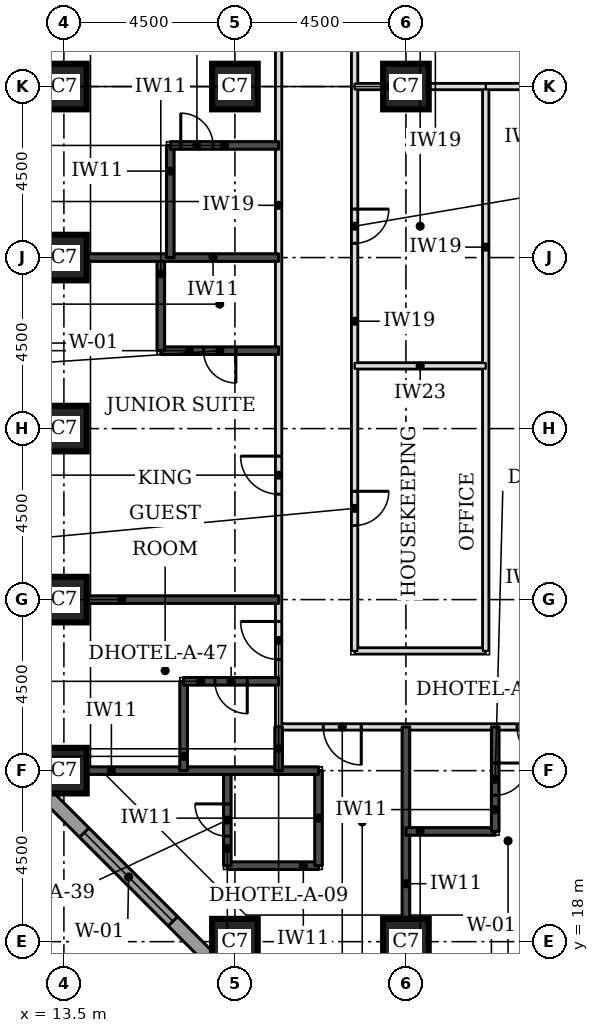
"""IFC4 building model, lengths in metres.
Left out: names, types, materials, properties, quantities, classifications, styles, units other than length and angle.
Written with IfcOpenShell. Run it as: python <this file> out.ifc"""

import sys

from ifc_helpers import new_model, si_unit, direction, frame, frame_2d, origin, origin_2d, place, context, subcontext, project, spatial, rectangle, extrude, element, fill, save


model = new_model("IFC4")
c1 = context("Model", 3, precision=1e-05, world=origin(), true_north=direction((0.0, 1.0)))
c2 = subcontext(c1, "Body", "Model", "MODEL_VIEW")
j1 = project(units=[si_unit("LENGTHUNIT", "METRE"), si_unit("PLANEANGLEUNIT", "RADIAN")], contexts=[c1])
p1 = place(None, origin())
s1 = spatial("IfcSite", under=j1, at=p1, CompositionType="ELEMENT")
p2 = place(p1, origin())
s2 = spatial("IfcBuilding", under=s1, at=p2, CompositionType="ELEMENT")
p3 = place(p2, frame((0.0, 0.0, 49.5)))
s3 = spatial("IfcBuildingStorey", under=s2, at=p3, CompositionType="ELEMENT", Elevation=49.5)
for number, where, z_axis, x_axis in (
    (1, (18.0, 18.0, 0.0), (0.0, 0.0, 1.0), (1.0, 0.0, 0.0)),
    (2, (22.5, 18.0, 0.0), (0.0, 0.0, 1.0), (1.0, 0.0, 0.0)),
    (3, (13.5, 22.5, 0.0), (0.0, 0.0, 1.0), (1.0, 0.0, 0.0)),
    (4, (13.5, 27.0, 0.0), (0.0, 0.0, 1.0), (1.0, 0.0, 0.0)),
    (5, (13.5, 31.5, 0.0), (0.0, 0.0, 1.0), (1.0, 0.0, 0.0)),
    (6, (13.5, 36.0, 0.0), (0.0, 0.0, 1.0), (1.0, 0.0, 0.0)),
    (7, (13.5, 40.5, 0.0), (0.0, 0.0, 1.0), (1.0, 0.0, 0.0)),
    (8, (18.0, 40.5, 0.0), (0.0, 0.0, 1.0), (1.0, 0.0, 0.0)),
    (9, (22.5, 40.5, 0.0), (0.0, 0.0, 1.0), (1.0, 0.0, 0.0)),
):
    element("IfcColumn", number, at=place(p3, frame(where, z_axis=z_axis, x_axis=x_axis)), inside=s3, PredefinedType="COLUMN", context=c2, shape_type="SweptSolid", body=[
        extrude(rectangle(XDim=1.2, YDim=1.2, at=origin_2d()), origin(), (0.0, 0.0, 1.0), 3.3),
    ])
p4 = place(p3, frame((12.674, 22.23, 0.0), z_axis=(0.0, 0.0, 1.0), x_axis=(0.707106781187, -0.707106781187, 0.0)))
e10 = element("IfcWall", 10, at=p4, inside=s3, PredefinedType="STANDARD", context=c2, shape_type="SweptSolid", body=[
    extrude(rectangle(XDim=7.151, YDim=0.35, at=frame_2d((3.576, 0.0))), origin(), (0.0, 0.0, 1.0), 3.055),
])
p5 = place(p4, frame((1.926, 0.0, 0.8)))
e11 = element("IfcOpeningElement", 11, at=p5, cuts=e10, PredefinedType="OPENING", context=c2, shape_type="SweptSolid", body=[
    extrude(rectangle(XDim=3.3, YDim=1.5, at=frame_2d((1.65, 0.75))), frame((0.0, 0.185, 0.0), z_axis=(0.0, -1.0, 0.0), x_axis=(1.0, 0.0, 0.0)), (0.0, 0.0, 1.0), 0.37),
])
p6 = place(p3, frame((19.15, 23.65, 0.0), z_axis=(0.0, 0.0, 1.0), x_axis=(1.0, 0.0, 0.0)))
e12 = element("IfcWall", 12, at=p6, inside=s3, PredefinedType="PARTITIONING", context=c2, shape_type="SweptSolid", body=[
    extrude(rectangle(XDim=32.35, YDim=0.15, at=frame_2d((16.175, 0.0))), origin(), (0.0, 0.0, 1.0), 3.08),
])
p7 = place(p6, frame((6.275, 0.0, 0.0)))
e13 = element("IfcOpeningElement", 13, at=p7, cuts=e12, PredefinedType="OPENING", context=c2, shape_type="SweptSolid", body=[
    extrude(rectangle(XDim=1.0, YDim=2.1, at=frame_2d((0.5, 1.05))), frame((0.0, 0.085, 0.0), z_axis=(0.0, -1.0, 0.0), x_axis=(1.0, 0.0, 0.0)), (0.0, 0.0, 1.0), 0.17),
])
p8 = place(p6, frame((8.675, 0.0, 0.0)))
e14 = element("IfcOpeningElement", 14, at=p8, cuts=e12, PredefinedType="OPENING", context=c2, shape_type="SweptSolid", body=[
    extrude(rectangle(XDim=1.0, YDim=2.1, at=frame_2d((0.5, 1.05))), frame((0.0, 0.085, 0.0), z_axis=(0.0, -1.0, 0.0), x_axis=(1.0, 0.0, 0.0)), (0.0, 0.0, 1.0), 0.17),
])
p9 = place(p6, frame((15.25, 0.0, 0.0)))
e15 = element("IfcOpeningElement", 15, at=p9, cuts=e12, PredefinedType="OPENING", context=c2, shape_type="SweptSolid", body=[
    extrude(rectangle(XDim=1.0, YDim=2.1, at=frame_2d((0.5, 1.05))), frame((0.0, 0.085, 0.0), z_axis=(0.0, -1.0, 0.0), x_axis=(1.0, 0.0, 0.0)), (0.0, 0.0, 1.0), 0.17),
])
p10 = place(p6, frame((17.675, 0.0, 0.0)))
e16 = element("IfcOpeningElement", 16, at=p10, cuts=e12, PredefinedType="OPENING", context=c2, shape_type="SweptSolid", body=[
    extrude(rectangle(XDim=1.0, YDim=2.1, at=frame_2d((0.5, 1.05))), frame((0.0, 0.085, 0.0), z_axis=(0.0, -1.0, 0.0), x_axis=(1.0, 0.0, 0.0)), (0.0, 0.0, 1.0), 0.17),
])
p11 = place(p6, frame((24.275, 0.0, 0.0)))
e17 = element("IfcOpeningElement", 17, at=p11, cuts=e12, PredefinedType="OPENING", context=c2, shape_type="SweptSolid", body=[
    extrude(rectangle(XDim=1.0, YDim=2.1, at=frame_2d((0.5, 1.05))), frame((0.0, 0.085, 0.0), z_axis=(0.0, -1.0, 0.0), x_axis=(1.0, 0.0, 0.0)), (0.0, 0.0, 1.0), 0.17),
])
p12 = place(p6, frame((26.675, 0.0, 0.0)))
e18 = element("IfcOpeningElement", 18, at=p12, cuts=e12, PredefinedType="OPENING", context=c2, shape_type="SweptSolid", body=[
    extrude(rectangle(XDim=1.0, YDim=2.1, at=frame_2d((0.5, 1.05))), frame((0.0, 0.085, 0.0), z_axis=(0.0, -1.0, 0.0), x_axis=(1.0, 0.0, 0.0)), (0.0, 0.0, 1.0), 0.17),
])
p13 = place(p6, frame((1.175, 0.0, 0.0)))
e19 = element("IfcOpeningElement", 19, at=p13, cuts=e12, PredefinedType="OPENING", context=c2, shape_type="SweptSolid", body=[
    extrude(rectangle(XDim=1.0, YDim=2.1, at=frame_2d((0.5, 1.05))), frame((0.0, 0.085, 0.0), z_axis=(0.0, -1.0, 0.0), x_axis=(1.0, 0.0, 0.0)), (0.0, 0.0, 1.0), 0.17),
])
p14 = place(p6, frame((30.85, 0.0, 0.0)))
e20 = element("IfcOpeningElement", 20, at=p14, cuts=e12, PredefinedType="OPENING", context=c2, shape_type="SweptSolid", body=[
    extrude(rectangle(XDim=1.0, YDim=2.1, at=frame_2d((0.5, 1.05))), frame((0.0, 0.085, 0.0), z_axis=(0.0, -1.0, 0.0), x_axis=(1.0, 0.0, 0.0)), (0.0, 0.0, 1.0), 0.17),
])
p15 = place(p3, frame((19.15, 23.65, 0.0), z_axis=(0.0, 0.0, 1.0), x_axis=(0.0, 1.0, 0.0)))
e21 = element("IfcWall", 21, at=p15, inside=s3, PredefinedType="PARTITIONING", context=c2, shape_type="SweptSolid", body=[
    extrude(rectangle(XDim=25.85, YDim=0.15, at=frame_2d((12.925, 0.0))), origin(), (0.0, 0.0, 1.0), 3.08),
])
p16 = place(p15, frame((1.775, 0.0, 0.0)))
e22 = element("IfcOpeningElement", 22, at=p16, cuts=e21, PredefinedType="OPENING", context=c2, shape_type="SweptSolid", body=[
    extrude(rectangle(XDim=1.0, YDim=2.1, at=frame_2d((0.5, 1.05))), frame((0.0, 0.085, 0.0), z_axis=(0.0, -1.0, 0.0), x_axis=(1.0, 0.0, 0.0)), (0.0, 0.0, 1.0), 0.17),
])
p17 = place(p15, frame((6.125, 0.0, 0.0)))
e23 = element("IfcOpeningElement", 23, at=p17, cuts=e21, PredefinedType="OPENING", context=c2, shape_type="SweptSolid", body=[
    extrude(rectangle(XDim=1.0, YDim=2.1, at=frame_2d((0.5, 1.05))), frame((0.0, 0.085, 0.0), z_axis=(0.0, -1.0, 0.0), x_axis=(1.0, 0.0, 0.0)), (0.0, 0.0, 1.0), 0.17),
])
p18 = place(p15, frame((17.825, 0.0, 0.0)))
e24 = element("IfcOpeningElement", 24, at=p18, cuts=e21, PredefinedType="OPENING", context=c2, shape_type="SweptSolid", body=[
    extrude(rectangle(XDim=1.0, YDim=2.1, at=frame_2d((0.5, 1.05))), frame((0.0, 0.085, 0.0), z_axis=(0.0, -1.0, 0.0), x_axis=(1.0, 0.0, 0.0)), (0.0, 0.0, 1.0), 0.17),
])
p19 = place(p15, frame((23.04, 0.0, 0.0)))
e25 = element("IfcOpeningElement", 25, at=p19, cuts=e21, PredefinedType="OPENING", context=c2, shape_type="SweptSolid", body=[
    extrude(rectangle(XDim=0.9, YDim=2.1, at=frame_2d((0.45, 1.05))), frame((0.0, 0.085, 0.0), z_axis=(0.0, -1.0, 0.0), x_axis=(1.0, 0.0, 0.0)), (0.0, 0.0, 1.0), 0.17),
])
p20 = place(p3, frame((21.15, 25.65, 0.0), z_axis=(0.0, 0.0, 1.0), x_axis=(1.0, 0.0, 0.0)))
e26 = element("IfcWall", 26, at=p20, inside=s3, PredefinedType="PARTITIONING", context=c2, shape_type="SweptSolid", body=[
    extrude(rectangle(XDim=3.45, YDim=0.15, at=frame_2d((1.725, 0.0))), origin(), (0.0, 0.0, 1.0), 3.08),
])
p21 = place(p3, frame((21.15, 25.65, 0.0), z_axis=(0.0, 0.0, 1.0), x_axis=(0.0, 1.0, 0.0)))
e27 = element("IfcWall", 27, at=p21, inside=s3, PredefinedType="PARTITIONING", context=c2, shape_type="SweptSolid", body=[
    extrude(rectangle(XDim=17.35, YDim=0.15, at=frame_2d((8.675, 0.0))), origin(), (0.0, 0.0, 1.0), 3.08),
])
p22 = place(p21, frame((3.3, 0.0, 0.0)))
e28 = element("IfcOpeningElement", 28, at=p22, cuts=e27, PredefinedType="OPENING", context=c2, shape_type="SweptSolid", body=[
    extrude(rectangle(XDim=0.9, YDim=2.1, at=frame_2d((0.45, 1.05))), frame((0.0, 0.085, 0.0), z_axis=(0.0, -1.0, 0.0), x_axis=(1.0, 0.0, 0.0)), (0.0, 0.0, 1.0), 0.17),
])
p23 = place(p21, frame((10.725, 0.0, 0.0)))
e29 = element("IfcOpeningElement", 29, at=p23, cuts=e27, PredefinedType="OPENING", context=c2, shape_type="SweptSolid", body=[
    extrude(rectangle(XDim=0.9, YDim=2.1, at=frame_2d((0.45, 1.05))), frame((0.0, 0.085, 0.0), z_axis=(0.0, -1.0, 0.0), x_axis=(1.0, 0.0, 0.0)), (0.0, 0.0, 1.0), 0.17),
])
p24 = place(p3, frame((24.6, 25.65, 0.0), z_axis=(0.0, 0.0, 1.0), x_axis=(0.0, 1.0, 0.0)))
e30 = element("IfcWall", 30, at=p24, inside=s3, PredefinedType="PARTITIONING", context=c2, shape_type="SweptSolid", body=[
    extrude(rectangle(XDim=14.85, YDim=0.15, at=frame_2d((7.425, 0.0))), origin(), (0.0, 0.0, 1.0), 3.08),
])
p25 = place(p3, frame((24.6, 40.5, 0.0), z_axis=(0.0, 0.0, 1.0), x_axis=(1.0, 0.0, 0.0)))
e31 = element("IfcWall", 31, at=p25, inside=s3, PredefinedType="PARTITIONING", context=c2, shape_type="SweptSolid", body=[
    extrude(rectangle(XDim=2.35, YDim=0.15, at=frame_2d((1.175, 0.0))), origin(), (0.0, 0.0, 1.0), 2.33),
])
p26 = place(p3, frame((22.5, 18.6, 0.0), z_axis=(0.0, 0.0, 1.0), x_axis=(0.0, 1.0, 0.0)))
e32 = element("IfcWall", 32, at=p26, inside=s3, PredefinedType="SOLIDWALL", context=c2, shape_type="SweptSolid", body=[
    extrude(rectangle(XDim=5.05, YDim=0.2, at=frame_2d((2.525, 0.0))), origin(), (0.0, 0.0, 1.0), 3.08),
])
p27 = place(p3, frame((17.8, 20.0, 0.0), z_axis=(0.0, 0.0, 1.0), x_axis=(1.0, 0.0, 0.0)))
e33 = element("IfcWall", 33, at=p27, inside=s3, PredefinedType="SOLIDWALL", context=c2, shape_type="SweptSolid", body=[
    extrude(rectangle(XDim=2.4, YDim=0.2, at=frame_2d((1.2, 0.0))), origin(), (0.0, 0.0, 1.0), 3.08),
])
p28 = place(p3, frame((17.8, 20.0, 0.0), z_axis=(0.0, 0.0, 1.0), x_axis=(0.0, 1.0, 0.0)))
e34 = element("IfcWall", 34, at=p28, inside=s3, PredefinedType="SOLIDWALL", context=c2, shape_type="SweptSolid", body=[
    extrude(rectangle(XDim=2.5, YDim=0.2, at=frame_2d((1.25, 0.0))), origin(), (0.0, 0.0, 1.0), 3.08),
])
p29 = place(p28, frame((0.775, 0.0, 0.0)))
e35 = element("IfcOpeningElement", 35, at=p29, cuts=e34, PredefinedType="OPENING", context=c2, shape_type="SweptSolid", body=[
    extrude(rectangle(XDim=0.85, YDim=2.1, at=frame_2d((0.425, 1.05))), frame((0.0, 0.11, 0.0), z_axis=(0.0, -1.0, 0.0), x_axis=(1.0, 0.0, 0.0)), (0.0, 0.0, 1.0), 0.22),
])
p30 = place(p3, frame((20.2, 20.0, 0.0), z_axis=(0.0, 0.0, 1.0), x_axis=(0.0, 1.0, 0.0)))
e36 = element("IfcWall", 36, at=p30, inside=s3, PredefinedType="SOLIDWALL", context=c2, shape_type="SweptSolid", body=[
    extrude(rectangle(XDim=2.5, YDim=0.2, at=frame_2d((1.25, 0.0))), origin(), (0.0, 0.0, 1.0), 3.08),
])
p31 = place(p3, frame((22.5, 20.9, 0.0), z_axis=(0.0, 0.0, 1.0), x_axis=(1.0, 0.0, 0.0)))
e37 = element("IfcWall", 37, at=p31, inside=s3, PredefinedType="SOLIDWALL", context=c2, shape_type="SweptSolid", body=[
    extrude(rectangle(XDim=2.35, YDim=0.2, at=frame_2d((1.175, 0.0))), origin(), (0.0, 0.0, 1.0), 3.08),
])
p32 = place(p3, frame((24.85, 20.9, 0.0), z_axis=(0.0, 0.0, 1.0), x_axis=(0.0, 1.0, 0.0)))
e38 = element("IfcWall", 38, at=p32, inside=s3, PredefinedType="SOLIDWALL", context=c2, shape_type="SweptSolid", body=[
    extrude(rectangle(XDim=2.75, YDim=0.2, at=frame_2d((1.375, 0.0))), origin(), (0.0, 0.0, 1.0), 3.08),
])
p33 = place(p32, frame((0.95, 0.0, 0.0)))
e39 = element("IfcOpeningElement", 39, at=p33, cuts=e38, PredefinedType="OPENING", context=c2, shape_type="SweptSolid", body=[
    extrude(rectangle(XDim=0.85, YDim=2.1, at=frame_2d((0.425, 1.05))), frame((0.0, 0.11, 0.0), z_axis=(0.0, -1.0, 0.0), x_axis=(1.0, 0.0, 0.0)), (0.0, 0.0, 1.0), 0.22),
])
p34 = place(p3, frame((14.1, 22.5, 0.0), z_axis=(0.0, 0.0, 1.0), x_axis=(1.0, 0.0, 0.0)))
e40 = element("IfcWall", 40, at=p34, inside=s3, PredefinedType="SOLIDWALL", context=c2, shape_type="SweptSolid", body=[
    extrude(rectangle(XDim=6.1, YDim=0.2, at=frame_2d((3.05, 0.0))), origin(), (0.0, 0.0, 1.0), 3.08),
])
p35 = place(p3, frame((16.65, 22.5, 0.0), z_axis=(0.0, 0.0, 1.0), x_axis=(0.0, 1.0, 0.0)))
e41 = element("IfcWall", 41, at=p35, inside=s3, PredefinedType="SOLIDWALL", context=c2, shape_type="SweptSolid", body=[
    extrude(rectangle(XDim=2.35, YDim=0.2, at=frame_2d((1.175, 0.0))), origin(), (0.0, 0.0, 1.0), 3.08),
])
p36 = place(p3, frame((19.15, 22.5, 0.0), z_axis=(0.0, 0.0, 1.0), x_axis=(0.0, 1.0, 0.0)))
e42 = element("IfcWall", 42, at=p36, inside=s3, PredefinedType="SOLIDWALL", context=c2, shape_type="SweptSolid", body=[
    extrude(rectangle(XDim=1.15, YDim=0.2, at=frame_2d((0.575, 0.0))), origin(), (0.0, 0.0, 1.0), 3.08),
])
p37 = place(p3, frame((16.65, 24.85, 0.0), z_axis=(0.0, 0.0, 1.0), x_axis=(1.0, 0.0, 0.0)))
e43 = element("IfcWall", 43, at=p37, inside=s3, PredefinedType="SOLIDWALL", context=c2, shape_type="SweptSolid", body=[
    extrude(rectangle(XDim=2.5, YDim=0.2, at=frame_2d((1.25, 0.0))), origin(), (0.0, 0.0, 1.0), 3.08),
])
p38 = place(p37, frame((0.825, 0.0, 0.0)))
e44 = element("IfcOpeningElement", 44, at=p38, cuts=e43, PredefinedType="OPENING", context=c2, shape_type="SweptSolid", body=[
    extrude(rectangle(XDim=0.85, YDim=2.1, at=frame_2d((0.425, 1.05))), frame((0.0, 0.11, 0.0), z_axis=(0.0, -1.0, 0.0), x_axis=(1.0, 0.0, 0.0)), (0.0, 0.0, 1.0), 0.22),
])
p39 = place(p3, frame((14.1, 27.0, 0.0), z_axis=(0.0, 0.0, 1.0), x_axis=(1.0, 0.0, 0.0)))
e45 = element("IfcWall", 45, at=p39, inside=s3, PredefinedType="SOLIDWALL", context=c2, shape_type="SweptSolid", body=[
    extrude(rectangle(XDim=5.05, YDim=0.2, at=frame_2d((2.525, 0.0))), origin(), (0.0, 0.0, 1.0), 3.08),
])
p40 = place(p3, frame((16.05, 33.55, 0.0), z_axis=(0.0, 0.0, 1.0), x_axis=(1.0, 0.0, 0.0)))
e46 = element("IfcWall", 46, at=p40, inside=s3, PredefinedType="SOLIDWALL", context=c2, shape_type="SweptSolid", body=[
    extrude(rectangle(XDim=3.1, YDim=0.2, at=frame_2d((1.55, 0.0))), origin(), (0.0, 0.0, 1.0), 3.08),
])
p41 = place(p40, frame((1.125, 0.0, 0.0)))
e47 = element("IfcOpeningElement", 47, at=p41, cuts=e46, PredefinedType="OPENING", context=c2, shape_type="SweptSolid", body=[
    extrude(rectangle(XDim=0.85, YDim=2.1, at=frame_2d((0.425, 1.05))), frame((0.0, 0.11, 0.0), z_axis=(0.0, -1.0, 0.0), x_axis=(1.0, 0.0, 0.0)), (0.0, 0.0, 1.0), 0.22),
])
p42 = place(p3, frame((16.05, 33.55, 0.0), z_axis=(0.0, 0.0, 1.0), x_axis=(0.0, 1.0, 0.0)))
e48 = element("IfcWall", 48, at=p42, inside=s3, PredefinedType="SOLIDWALL", context=c2, shape_type="SweptSolid", body=[
    extrude(rectangle(XDim=2.45, YDim=0.2, at=frame_2d((1.225, 0.0))), origin(), (0.0, 0.0, 1.0), 3.08),
])
p43 = place(p3, frame((14.1, 36.0, 0.0), z_axis=(0.0, 0.0, 1.0), x_axis=(1.0, 0.0, 0.0)))
e49 = element("IfcWall", 49, at=p43, inside=s3, PredefinedType="SOLIDWALL", context=c2, shape_type="SweptSolid", body=[
    extrude(rectangle(XDim=5.05, YDim=0.2, at=frame_2d((2.525, 0.0))), origin(), (0.0, 0.0, 1.0), 3.08),
])
p44 = place(p3, frame((16.3, 36.0, 0.0), z_axis=(0.0, 0.0, 1.0), x_axis=(0.0, 1.0, 0.0)))
e50 = element("IfcWall", 50, at=p44, inside=s3, PredefinedType="SOLIDWALL", context=c2, shape_type="SweptSolid", body=[
    extrude(rectangle(XDim=2.95, YDim=0.2, at=frame_2d((1.475, 0.0))), origin(), (0.0, 0.0, 1.0), 3.08),
])
p45 = place(p3, frame((16.3, 38.95, 0.0), z_axis=(0.0, 0.0, 1.0), x_axis=(1.0, 0.0, 0.0)))
e51 = element("IfcWall", 51, at=p45, inside=s3, PredefinedType="SOLIDWALL", context=c2, shape_type="SweptSolid", body=[
    extrude(rectangle(XDim=2.85, YDim=0.2, at=frame_2d((1.425, 0.0))), origin(), (0.0, 0.0, 1.0), 3.08),
])
p46 = place(p45, frame((0.275, 0.0, 0.0)))
e52 = element("IfcOpeningElement", 52, at=p46, cuts=e51, PredefinedType="OPENING", context=c2, shape_type="SweptSolid", body=[
    extrude(rectangle(XDim=0.85, YDim=2.1, at=frame_2d((0.425, 1.05))), frame((0.0, 0.11, 0.0), z_axis=(0.0, -1.0, 0.0), x_axis=(1.0, 0.0, 0.0)), (0.0, 0.0, 1.0), 0.22),
])
p47 = place(p3, frame((21.15, 33.15, 0.0), z_axis=(0.0, 0.0, 1.0), x_axis=(1.0, 0.0, 0.0)))
e53 = element("IfcWall", 53, at=p47, inside=s3, PredefinedType="PARTITIONING", context=c2, shape_type="SweptSolid", body=[
    extrude(rectangle(XDim=3.45, YDim=0.15, at=frame_2d((1.725, 0.0))), origin(), (0.0, 0.0, 1.0), 3.08),
])
p48 = place(p3, frame((21.15, 40.5, 0.0), z_axis=(0.0, 0.0, 1.0), x_axis=(1.0, 0.0, 0.0)))
e54 = element("IfcWall", 54, at=p48, inside=s3, PredefinedType="PARTITIONING", context=c2, shape_type="SweptSolid", body=[
    extrude(rectangle(XDim=3.45, YDim=0.15, at=frame_2d((1.725, 0.0))), origin(), (0.0, 0.0, 1.0), 2.33),
])
p49 = place(p5, origin())
e55 = element("IfcWindow", 55, at=p49, inside=s3, PartitioningType="SINGLE_PANEL", PredefinedType="WINDOW", context=c2, shape_type="SweptSolid", body=[
    extrude(rectangle(XDim=3.3, YDim=1.5, at=frame_2d((1.65, 0.75))), frame((0.0, 0.085, 0.0), z_axis=(0.0, -1.0, 0.0), x_axis=(1.0, 0.0, 0.0)), (0.0, 0.0, 1.0), 0.06),
])
fill(e11, e55)
p50 = place(p7, frame((1.0, 0.0, 0.0), z_axis=(0.0, 0.0, 1.0), x_axis=(-1.0, 0.0, 0.0)))
e56 = element("IfcDoor", 56, at=p50, inside=s3, OperationType="SINGLE_SWING_LEFT", PredefinedType="DOOR", context=c2, shape_type="SweptSolid", body=[
    extrude(rectangle(XDim=1.0, YDim=2.1, at=frame_2d((0.5, 1.05))), frame((0.0, 0.025, 0.0), z_axis=(0.0, -1.0, 0.0), x_axis=(1.0, 0.0, 0.0)), (0.0, 0.0, 1.0), 0.05),
])
fill(e13, e56)
p51 = place(p33, frame((0.85, 0.0, 0.0), z_axis=(0.0, 0.0, 1.0), x_axis=(-1.0, 0.0, 0.0)))
e57 = element("IfcDoor", 57, at=p51, inside=s3, OperationType="SINGLE_SWING_LEFT", PredefinedType="DOOR", context=c2, shape_type="SweptSolid", body=[
    extrude(rectangle(XDim=0.85, YDim=2.1, at=frame_2d((0.425, 1.05))), frame((0.0, 0.025, 0.0), z_axis=(0.0, -1.0, 0.0), x_axis=(1.0, 0.0, 0.0)), (0.0, 0.0, 1.0), 0.05),
])
fill(e39, e57)
p52 = place(p16, origin())
e58 = element("IfcDoor", 58, at=p52, inside=s3, OperationType="SINGLE_SWING_RIGHT", PredefinedType="DOOR", context=c2, shape_type="SweptSolid", body=[
    extrude(rectangle(XDim=1.0, YDim=2.1, at=frame_2d((0.5, 1.05))), frame((0.0, 0.025, 0.0), z_axis=(0.0, -1.0, 0.0), x_axis=(1.0, 0.0, 0.0)), (0.0, 0.0, 1.0), 0.05),
])
fill(e22, e58)
p53 = place(p38, frame((0.85, 0.0, 0.0), z_axis=(0.0, 0.0, 1.0), x_axis=(-1.0, 0.0, 0.0)))
e59 = element("IfcDoor", 59, at=p53, inside=s3, OperationType="SINGLE_SWING_LEFT", PredefinedType="DOOR", context=c2, shape_type="SweptSolid", body=[
    extrude(rectangle(XDim=0.85, YDim=2.1, at=frame_2d((0.425, 1.05))), frame((0.0, 0.025, 0.0), z_axis=(0.0, -1.0, 0.0), x_axis=(1.0, 0.0, 0.0)), (0.0, 0.0, 1.0), 0.05),
])
fill(e44, e59)
p54 = place(p17, origin())
e60 = element("IfcDoor", 60, at=p54, inside=s3, OperationType="SINGLE_SWING_RIGHT", PredefinedType="DOOR", context=c2, shape_type="SweptSolid", body=[
    extrude(rectangle(XDim=1.0, YDim=2.1, at=frame_2d((0.5, 1.05))), frame((0.0, 0.025, 0.0), z_axis=(0.0, -1.0, 0.0), x_axis=(1.0, 0.0, 0.0)), (0.0, 0.0, 1.0), 0.05),
])
fill(e23, e60)
p55 = place(p41, frame((0.85, 0.0, 0.0), z_axis=(0.0, 0.0, 1.0), x_axis=(-1.0, 0.0, 0.0)))
e61 = element("IfcDoor", 61, at=p55, inside=s3, OperationType="SINGLE_SWING_LEFT", PredefinedType="DOOR", context=c2, shape_type="SweptSolid", body=[
    extrude(rectangle(XDim=0.85, YDim=2.1, at=frame_2d((0.425, 1.05))), frame((0.0, 0.025, 0.0), z_axis=(0.0, -1.0, 0.0), x_axis=(1.0, 0.0, 0.0)), (0.0, 0.0, 1.0), 0.05),
])
fill(e47, e61)
p56 = place(p46, origin())
e62 = element("IfcDoor", 62, at=p56, inside=s3, OperationType="SINGLE_SWING_LEFT", PredefinedType="DOOR", context=c2, shape_type="SweptSolid", body=[
    extrude(rectangle(XDim=0.85, YDim=2.1, at=frame_2d((0.425, 1.05))), frame((0.0, 0.025, 0.0), z_axis=(0.0, -1.0, 0.0), x_axis=(1.0, 0.0, 0.0)), (0.0, 0.0, 1.0), 0.05),
])
fill(e52, e62)
p57 = place(p13, frame((1.0, 0.0, 0.0), z_axis=(0.0, 0.0, 1.0), x_axis=(-1.0, 0.0, 0.0)))
e63 = element("IfcDoor", 63, at=p57, inside=s3, OperationType="SINGLE_SWING_LEFT", PredefinedType="DOOR", context=c2, shape_type="SweptSolid", body=[
    extrude(rectangle(XDim=1.0, YDim=2.1, at=frame_2d((0.5, 1.05))), frame((0.0, 0.025, 0.0), z_axis=(0.0, -1.0, 0.0), x_axis=(1.0, 0.0, 0.0)), (0.0, 0.0, 1.0), 0.05),
])
fill(e19, e63)
p58 = place(p29, origin())
e64 = element("IfcDoor", 64, at=p58, inside=s3, OperationType="SINGLE_SWING_RIGHT", PredefinedType="DOOR", context=c2, shape_type="SweptSolid", body=[
    extrude(rectangle(XDim=0.85, YDim=2.1, at=frame_2d((0.425, 1.05))), frame((0.0, 0.025, 0.0), z_axis=(0.0, -1.0, 0.0), x_axis=(1.0, 0.0, 0.0)), (0.0, 0.0, 1.0), 0.05),
])
fill(e35, e64)
p59 = place(p22, frame((0.9, 0.0, 0.0), z_axis=(0.0, 0.0, 1.0), x_axis=(-1.0, 0.0, 0.0)))
e65 = element("IfcDoor", 65, at=p59, inside=s3, OperationType="SINGLE_SWING_LEFT", PredefinedType="DOOR", context=c2, shape_type="SweptSolid", body=[
    extrude(rectangle(XDim=0.9, YDim=2.1, at=frame_2d((0.45, 1.05))), frame((0.0, 0.025, 0.0), z_axis=(0.0, -1.0, 0.0), x_axis=(1.0, 0.0, 0.0)), (0.0, 0.0, 1.0), 0.05),
])
fill(e28, e65)
p60 = place(p23, frame((0.9, 0.0, 0.0), z_axis=(0.0, 0.0, 1.0), x_axis=(-1.0, 0.0, 0.0)))
e66 = element("IfcDoor", 66, at=p60, inside=s3, OperationType="SINGLE_SWING_LEFT", PredefinedType="DOOR", context=c2, shape_type="SweptSolid", body=[
    extrude(rectangle(XDim=0.9, YDim=2.1, at=frame_2d((0.45, 1.05))), frame((0.0, 0.025, 0.0), z_axis=(0.0, -1.0, 0.0), x_axis=(1.0, 0.0, 0.0)), (0.0, 0.0, 1.0), 0.05),
])
fill(e29, e66)
save(model, sys.argv[1])
